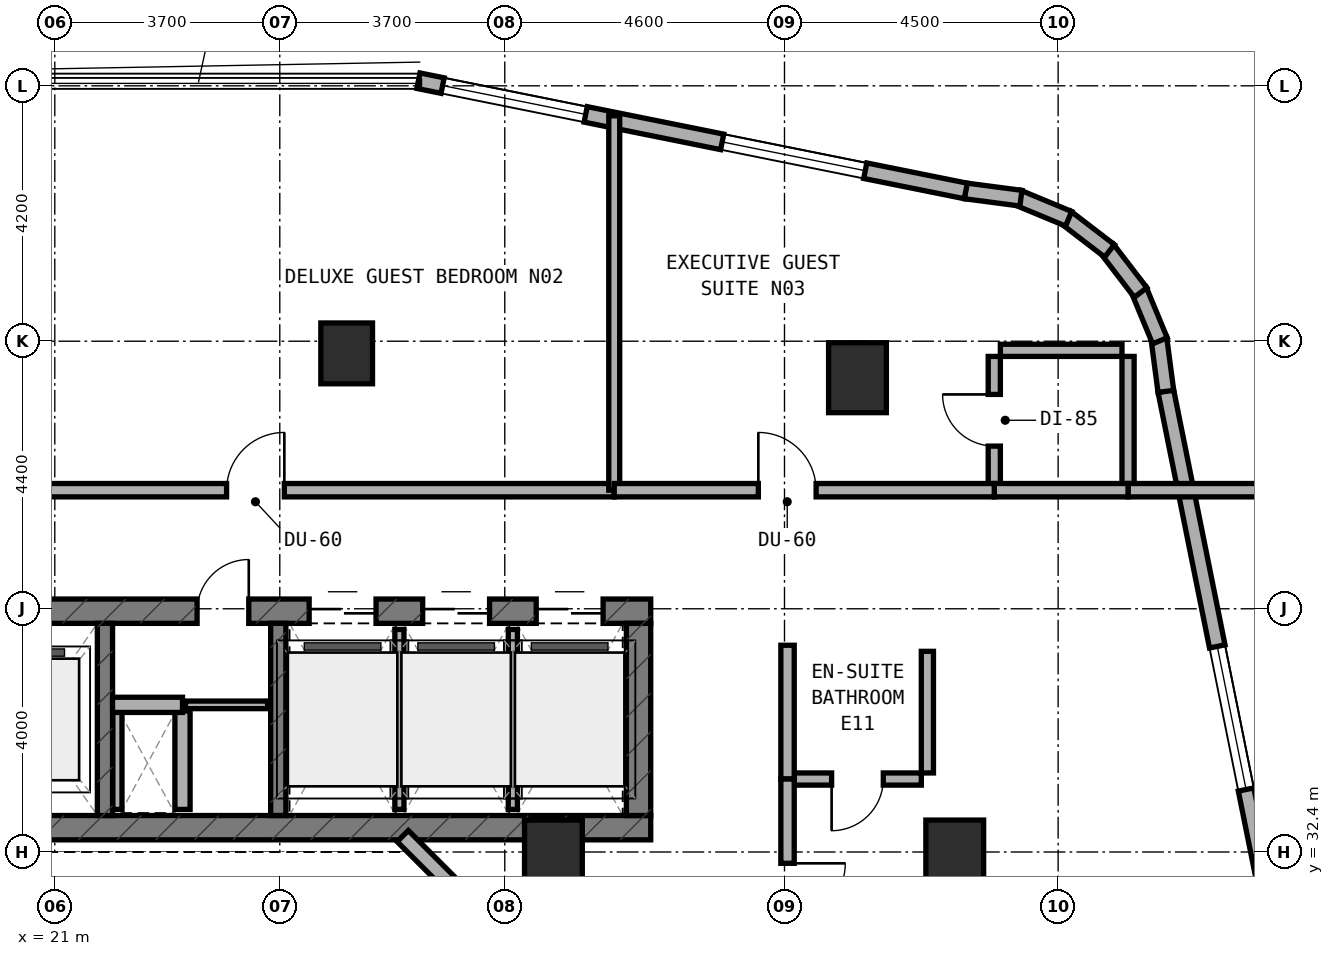
"""IFC4 building model, lengths in metres.
Left out: names, types, materials, properties, quantities, classifications, styles, units other than length and angle.
Written with IfcOpenShell. Run it as: python <this file> out.ifc"""

import sys

from ifc_helpers import new_model, si_unit, direction, frame, frame_2d, origin, origin_2d, place, context, subcontext, project, spatial, rectangle, extrude, element, fill, save


model = new_model("IFC4")
c1 = context("Model", 3, precision=1e-05, world=origin(), true_north=direction((0.0, 1.0)))
c2 = subcontext(c1, "Body", "Model", "MODEL_VIEW")
j1 = project(units=[si_unit("LENGTHUNIT", "METRE"), si_unit("PLANEANGLEUNIT", "RADIAN")], contexts=[c1])
p1 = place(None, origin())
s1 = spatial("IfcSite", under=j1, at=p1, CompositionType="ELEMENT")
p2 = place(p1, origin())
s2 = spatial("IfcBuilding", under=s1, at=p2, CompositionType="ELEMENT")
p3 = place(p2, frame((0.0, 0.0, 116.0)))
s3 = spatial("IfcBuildingStorey", under=s2, at=p3, CompositionType="ELEMENT", Elevation=116.0)
p4 = place(p3, frame((6.4, 32.8, 0.0), z_axis=(0.0, 0.0, 1.0), x_axis=(1.0, 0.0, 0.0)))
e1 = element("IfcWall", 1, at=p4, inside=s3, PredefinedType="SHEAR", context=c2, shape_type="SweptSolid", body=[
    extrude(rectangle(XDim=24.4, YDim=0.4, at=frame_2d((12.2, 0.0))), origin(), (0.0, 0.0, 1.0), 3.5),
])
p5 = place(p4, frame((6.05, 0.0, 0.0)))
e2 = element("IfcOpeningElement", 2, at=p5, cuts=e1, PredefinedType="OPENING", context=c2, shape_type="SweptSolid", body=[
    extrude(rectangle(XDim=1.1, YDim=2.15, at=frame_2d((0.55, 1.075))), frame((0.0, 0.21, 0.0), z_axis=(0.0, -1.0, 0.0), x_axis=(1.0, 0.0, 0.0)), (0.0, 0.0, 1.0), 0.42),
])
p6 = place(p3, frame((6.4, 36.36, 0.0), z_axis=(0.0, 0.0, 1.0), x_axis=(1.0, 0.0, 0.0)))
e3 = element("IfcWall", 3, at=p6, inside=s3, PredefinedType="SHEAR", context=c2, shape_type="SweptSolid", body=[
    extrude(rectangle(XDim=24.4, YDim=0.4, at=frame_2d((12.2, 0.0))), origin(), (0.0, 0.0, 1.0), 3.5),
])
p7 = place(p6, frame((9.15, 0.0, 0.0)))
e4 = element("IfcOpeningElement", 4, at=p7, cuts=e3, PredefinedType="OPENING", context=c2, shape_type="SweptSolid", body=[
    extrude(rectangle(XDim=1.2, YDim=2.15, at=frame_2d((0.6, 1.075))), frame((0.0, 0.21, 0.0), z_axis=(0.0, -1.0, 0.0), x_axis=(1.0, 0.0, 0.0)), (0.0, 0.0, 1.0), 0.42),
])
p8 = place(p6, frame((16.94, 0.0, 0.0)))
e5 = element("IfcOpeningElement", 5, at=p8, cuts=e3, PredefinedType="OPENING", context=c2, shape_type="SweptSolid", body=[
    extrude(rectangle(XDim=0.85, YDim=2.1, at=frame_2d((0.425, 1.05))), frame((0.0, 0.21, 0.0), z_axis=(0.0, -1.0, 0.0), x_axis=(1.0, 0.0, 0.0)), (0.0, 0.0, 1.0), 0.42),
])
p9 = place(p6, frame((18.783, 0.0, 0.0)))
e6 = element("IfcOpeningElement", 6, at=p9, cuts=e3, PredefinedType="OPENING", context=c2, shape_type="SweptSolid", body=[
    extrude(rectangle(XDim=1.1, YDim=2.15, at=frame_2d((0.55, 1.075))), frame((0.0, 0.21, 0.0), z_axis=(0.0, -1.0, 0.0), x_axis=(1.0, 0.0, 0.0)), (0.0, 0.0, 1.0), 0.42),
])
p10 = place(p6, frame((20.65, 0.0, 0.0)))
e7 = element("IfcOpeningElement", 7, at=p10, cuts=e3, PredefinedType="OPENING", context=c2, shape_type="SweptSolid", body=[
    extrude(rectangle(XDim=1.1, YDim=2.15, at=frame_2d((0.55, 1.075))), frame((0.0, 0.21, 0.0), z_axis=(0.0, -1.0, 0.0), x_axis=(1.0, 0.0, 0.0)), (0.0, 0.0, 1.0), 0.42),
])
p11 = place(p6, frame((22.517, 0.0, 0.0)))
e8 = element("IfcOpeningElement", 8, at=p11, cuts=e3, PredefinedType="OPENING", context=c2, shape_type="SweptSolid", body=[
    extrude(rectangle(XDim=1.1, YDim=2.15, at=frame_2d((0.55, 1.075))), frame((0.0, 0.21, 0.0), z_axis=(0.0, -1.0, 0.0), x_axis=(1.0, 0.0, 0.0)), (0.0, 0.0, 1.0), 0.42),
])
p12 = place(p3, frame((30.6, 33.0, 0.0), z_axis=(0.0, 0.0, 1.0), x_axis=(0.0, 1.0, 0.0)))
e9 = element("IfcWall", 9, at=p12, inside=s3, PredefinedType="SHEAR", context=c2, shape_type="SweptSolid", body=[
    extrude(rectangle(XDim=3.16, YDim=0.4, at=frame_2d((1.58, 0.0))), origin(), (0.0, 0.0, 1.0), 3.5),
])
for number, where, z_axis, x_axis in (
    (10, (21.825, 33.0, 0.0), (0.0, 0.0, 1.0), (0.0, 1.0, 0.0)),
    (11, (24.675, 33.0, 0.0), (0.0, 0.0, 1.0), (0.0, 1.0, 0.0)),
):
    element("IfcWall", number, at=place(p3, frame(where, z_axis=z_axis, x_axis=x_axis)), inside=s3, PredefinedType="STANDARD", context=c2, shape_type="SweptSolid", body=[
        extrude(rectangle(XDim=3.16, YDim=0.25, at=frame_2d((1.58, 0.0))), origin(), (0.0, 0.0, 1.0), 3.18),
    ])
p13 = place(p3, frame((25.8, 40.6, 0.0), z_axis=(0.0, 0.0, 1.0), x_axis=(1.0, 0.0, 0.0)))
e12 = element("IfcColumn", 12, at=p13, inside=s3, PredefinedType="COLUMN", context=c2, shape_type="SweptSolid", body=[
    extrude(rectangle(XDim=0.85, YDim=1.0, at=origin_2d()), origin(), (0.0, 0.0, 1.0), 3.5),
])
for number, where, z_axis, x_axis in (
    (13, (34.2, 40.2, 0.0), (0.0, 0.0, 1.0), (1.0, 0.0, 0.0)),
    (14, (35.8, 32.35, 0.0), (0.0, 0.0, 1.0), (1.0, 0.0, 0.0)),
    (15, (29.2, 32.35, 0.0), (0.0, 0.0, 1.0), (1.0, 0.0, 0.0)),
):
    element("IfcColumn", number, at=place(p3, frame(where, z_axis=z_axis, x_axis=x_axis)), inside=s3, PredefinedType="COLUMN", context=c2, shape_type="SweptSolid", body=[
        extrude(rectangle(XDim=0.95, YDim=1.15, at=origin_2d()), origin(), (0.0, 0.0, 1.0), 3.5),
    ])
p14 = place(p3, frame((41.084, 30.98, 0.0), z_axis=(0.0, 0.0, 1.0), x_axis=(-0.197435082048, 0.980315963543, 0.0)))
e16 = element("IfcWall", 16, at=p14, inside=s3, PredefinedType="STANDARD", context=c2, shape_type="SweptSolid", body=[
    extrude(rectangle(XDim=9.183, YDim=0.26, at=frame_2d((4.591, 0.0))), origin(), (0.0, 0.0, 1.0), 3.18),
])
p15 = place(p14, frame((2.497, 0.0, 0.8)))
e17 = element("IfcOpeningElement", 17, at=p15, cuts=e16, PredefinedType="OPENING", context=c2, shape_type="SweptSolid", body=[
    extrude(rectangle(XDim=2.4, YDim=1.6, at=frame_2d((1.2, 0.8))), frame((0.0, 0.14, 0.0), z_axis=(0.0, -1.0, 0.0), x_axis=(1.0, 0.0, 0.0)), (0.0, 0.0, 1.0), 0.28),
])
p16 = place(p3, frame((39.272, 39.975, 0.0), z_axis=(0.0, 0.0, 1.0), x_axis=(-0.130953706898, 0.991388484223, 0.0)))
e18 = element("IfcWall", 18, at=p16, inside=s3, PredefinedType="STANDARD", context=c2, shape_type="SweptSolid", body=[
    extrude(rectangle(XDim=0.885, YDim=0.26, at=frame_2d((0.443, 0.0))), origin(), (0.0, 0.0, 1.0), 3.18),
])
p17 = place(p3, frame((39.174, 40.807, 0.0), z_axis=(0.0, 0.0, 1.0), x_axis=(-0.383290660547, 0.923627776508, 0.0)))
e19 = element("IfcWall", 19, at=p17, inside=s3, PredefinedType="STANDARD", context=c2, shape_type="SweptSolid", body=[
    extrude(rectangle(XDim=0.903, YDim=0.26, at=frame_2d((0.452, 0.0))), origin(), (0.0, 0.0, 1.0), 3.18),
])
p18 = place(p3, frame((38.856, 41.601, 0.0), z_axis=(0.0, 0.0, 1.0), x_axis=(-0.608624690463, 0.793458244748, 0.0)))
e20 = element("IfcWall", 20, at=p18, inside=s3, PredefinedType="STANDARD", context=c2, shape_type="SweptSolid", body=[
    extrude(rectangle(XDim=0.902, YDim=0.26, at=frame_2d((0.451, 0.0))), origin(), (0.0, 0.0, 1.0), 3.18),
])
p19 = place(p3, frame((38.345, 42.286, 0.0), z_axis=(0.0, 0.0, 1.0), x_axis=(-0.793558456666, 0.608494022858, 0.0)))
e21 = element("IfcWall", 21, at=p19, inside=s3, PredefinedType="STANDARD", context=c2, shape_type="SweptSolid", body=[
    extrude(rectangle(XDim=0.902, YDim=0.26, at=frame_2d((0.451, 0.0))), origin(), (0.0, 0.0, 1.0), 3.18),
])
p20 = place(p3, frame((37.673, 42.814, 0.0), z_axis=(0.0, 0.0, 1.0), x_axis=(-0.923683767999, 0.383155708213, 0.0)))
e22 = element("IfcWall", 22, at=p20, inside=s3, PredefinedType="STANDARD", context=c2, shape_type="SweptSolid", body=[
    extrude(rectangle(XDim=0.903, YDim=0.26, at=frame_2d((0.451, 0.0))), origin(), (0.0, 0.0, 1.0), 3.18),
])
p21 = place(p3, frame((36.888, 43.152, 0.0), z_axis=(0.0, 0.0, 1.0), x_axis=(-0.991487658083, 0.130200706103, 0.0)))
e23 = element("IfcWall", 23, at=p21, inside=s3, PredefinedType="STANDARD", context=c2, shape_type="SweptSolid", body=[
    extrude(rectangle(XDim=0.921, YDim=0.26, at=frame_2d((0.46, 0.0))), origin(), (0.0, 0.0, 1.0), 3.18),
])
p22 = place(p3, frame((35.982, 43.271, 0.0), z_axis=(0.0, 0.0, 1.0), x_axis=(-0.980315963543, 0.197435082048, 0.0)))
e24 = element("IfcWall", 24, at=p22, inside=s3, PredefinedType="STANDARD", context=c2, shape_type="SweptSolid", body=[
    extrude(rectangle(XDim=9.183, YDim=0.26, at=frame_2d((4.591, 0.0))), origin(), (0.0, 0.0, 1.0), 3.18),
])
p23 = place(p22, frame((1.687, 0.0, 0.8)))
e25 = element("IfcOpeningElement", 25, at=p23, cuts=e24, PredefinedType="OPENING", context=c2, shape_type="SweptSolid", body=[
    extrude(rectangle(XDim=2.4, YDim=1.6, at=frame_2d((1.2, 0.8))), frame((0.0, 0.14, 0.0), z_axis=(0.0, -1.0, 0.0), x_axis=(1.0, 0.0, 0.0)), (0.0, 0.0, 1.0), 0.28),
])
p24 = place(p22, frame((6.377, 0.0, 0.8)))
e26 = element("IfcOpeningElement", 26, at=p24, cuts=e24, PredefinedType="OPENING", context=c2, shape_type="SweptSolid", body=[
    extrude(rectangle(XDim=2.4, YDim=1.6, at=frame_2d((1.2, 0.8))), frame((0.0, 0.14, 0.0), z_axis=(0.0, -1.0, 0.0), x_axis=(1.0, 0.0, 0.0)), (0.0, 0.0, 1.0), 0.28),
])
p25 = place(p3, frame((28.556, 30.828, 0.0), z_axis=(0.0, 0.0, 1.0), x_axis=(-0.707059717605, 0.707153841636, 0.0)))
e27 = element("IfcWall", 27, at=p25, inside=s3, PredefinedType="STANDARD", context=c2, shape_type="SweptSolid", body=[
    extrude(rectangle(XDim=2.594, YDim=0.26, at=frame_2d((1.297, 0.0))), origin(), (0.0, 0.0, 1.0), 3.18),
])
p26 = place(p3, frame((22.03, 33.1, 0.0), z_axis=(0.0, 0.0, 1.0), x_axis=(0.0, 1.0, 0.0)))
e28 = element("IfcWall", 28, at=p26, inside=s3, PredefinedType="PARTITIONING", context=c2, shape_type="SweptSolid", body=[
    extrude(rectangle(XDim=1.62, YDim=0.15, at=frame_2d((0.81, 0.0))), origin(), (0.0, 0.0, 1.0), 3.18),
])
p27 = place(p3, frame((23.1, 33.1, 0.0), z_axis=(0.0, 0.0, 1.0), x_axis=(0.0, 1.0, 0.0)))
e29 = element("IfcWall", 29, at=p27, inside=s3, PredefinedType="SOLIDWALL", context=c2, shape_type="SweptSolid", body=[
    extrude(rectangle(XDim=1.62, YDim=0.25, at=frame_2d((0.81, 0.0))), origin(), (0.0, 0.0, 1.0), 3.18),
])
p28 = place(p3, frame((21.95, 34.82, 0.0), z_axis=(0.0, 0.0, 1.0), x_axis=(1.0, 0.0, 0.0)))
e30 = element("IfcWall", 30, at=p28, inside=s3, PredefinedType="SOLIDWALL", context=c2, shape_type="SweptSolid", body=[
    extrude(rectangle(XDim=1.15, YDim=0.25, at=frame_2d((0.575, 0.0))), origin(), (0.0, 0.0, 1.0), 3.18),
])
p29 = place(p3, frame((23.15, 34.82, 0.0), z_axis=(0.0, 0.0, 1.0), x_axis=(1.0, 0.0, 0.0)))
e31 = element("IfcWall", 31, at=p29, inside=s3, PredefinedType="PARTITIONING", context=c2, shape_type="SweptSolid", body=[
    extrude(rectangle(XDim=1.35, YDim=0.125, at=frame_2d((0.675, 0.0))), origin(), (0.0, 0.0, 1.0), 3.18),
])
p30 = place(p3, frame((26.667, 33.1, 0.0), z_axis=(0.0, 0.0, 1.0), x_axis=(0.0, 1.0, 0.0)))
e32 = element("IfcWall", 32, at=p30, inside=s3, PredefinedType="PARTITIONING", context=c2, shape_type="SweptSolid", body=[
    extrude(rectangle(XDim=2.96, YDim=0.15, at=frame_2d((1.48, 0.0))), origin(), (0.0, 0.0, 1.0), 3.18),
])
p31 = place(p3, frame((28.533, 33.1, 0.0), z_axis=(0.0, 0.0, 1.0), x_axis=(0.0, 1.0, 0.0)))
e33 = element("IfcWall", 33, at=p31, inside=s3, PredefinedType="PARTITIONING", context=c2, shape_type="SweptSolid", body=[
    extrude(rectangle(XDim=2.96, YDim=0.15, at=frame_2d((1.48, 0.0))), origin(), (0.0, 0.0, 1.0), 2.655),
])
p32 = place(p3, frame((18.4, 38.35, 0.0), z_axis=(0.0, 0.0, 1.0), x_axis=(1.0, 0.0, 0.0)))
e34 = element("IfcWall", 34, at=p32, inside=s3, PredefinedType="SOLIDWALL", context=c2, shape_type="SweptSolid", body=[
    extrude(rectangle(XDim=11.8, YDim=0.22, at=frame_2d((5.9, 0.0))), origin(), (0.0, 0.0, 1.0), 2.655),
])
p33 = place(p32, frame((5.425, 0.0, 0.0)))
e35 = element("IfcOpeningElement", 35, at=p33, cuts=e34, PredefinedType="OPENING", context=c2, shape_type="SweptSolid", body=[
    extrude(rectangle(XDim=0.95, YDim=2.1, at=frame_2d((0.475, 1.05))), frame((0.0, 0.12, 0.0), z_axis=(0.0, -1.0, 0.0), x_axis=(1.0, 0.0, 0.0)), (0.0, 0.0, 1.0), 0.24),
])
p34 = place(p3, frame((30.2, 38.35, 0.0), z_axis=(0.0, 0.0, 1.0), x_axis=(0.0, 1.0, 0.0)))
e36 = element("IfcWall", 36, at=p34, inside=s3, PredefinedType="SOLIDWALL", context=c2, shape_type="SweptSolid", body=[
    extrude(rectangle(XDim=6.157, YDim=0.18, at=frame_2d((3.079, 0.0))), origin(), (0.0, 0.0, 1.0), 2.795),
])
p35 = place(p3, frame((36.45, 38.45, 0.0), z_axis=(0.0, 0.0, 1.0), x_axis=(0.0, 1.0, 0.0)))
e37 = element("IfcWall", 37, at=p35, inside=s3, PredefinedType="PLUMBINGWALL", context=c2, shape_type="SweptSolid", body=[
    extrude(rectangle(XDim=2.1, YDim=0.2, at=frame_2d((1.05, 0.0))), origin(), (0.0, 0.0, 1.0), 3.18),
])
p36 = place(p35, frame((0.625, 0.0, 0.0)))
e38 = element("IfcOpeningElement", 38, at=p36, cuts=e37, PredefinedType="OPENING", context=c2, shape_type="SweptSolid", body=[
    extrude(rectangle(XDim=0.85, YDim=2.1, at=frame_2d((0.425, 1.05))), frame((0.0, 0.11, 0.0), z_axis=(0.0, -1.0, 0.0), x_axis=(1.0, 0.0, 0.0)), (0.0, 0.0, 1.0), 0.22),
])
p37 = place(p3, frame((36.55, 40.65, 0.0), z_axis=(0.0, 0.0, 1.0), x_axis=(1.0, 0.0, 0.0)))
e39 = element("IfcWall", 39, at=p37, inside=s3, PredefinedType="PLUMBINGWALL", context=c2, shape_type="SweptSolid", body=[
    extrude(rectangle(XDim=2.0, YDim=0.2, at=frame_2d((1.0, 0.0))), origin(), (0.0, 0.0, 1.0), 3.18),
])
p38 = place(p3, frame((38.65, 38.45, 0.0), z_axis=(0.0, 0.0, 1.0), x_axis=(0.0, 1.0, 0.0)))
e40 = element("IfcWall", 40, at=p38, inside=s3, PredefinedType="PLUMBINGWALL", context=c2, shape_type="SweptSolid", body=[
    extrude(rectangle(XDim=2.1, YDim=0.2, at=frame_2d((1.05, 0.0))), origin(), (0.0, 0.0, 1.0), 3.18),
])
p39 = place(p3, frame((38.65, 38.35, 0.0), z_axis=(0.0, 0.0, 1.0), x_axis=(1.0, 0.0, 0.0)))
e41 = element("IfcWall", 41, at=p39, inside=s3, PredefinedType="SOLIDWALL", context=c2, shape_type="SweptSolid", body=[
    extrude(rectangle(XDim=2.39, YDim=0.22, at=frame_2d((1.195, 0.0))), origin(), (0.0, 0.0, 1.0), 3.18),
])
p40 = place(p3, frame((36.45, 38.35, 0.0), z_axis=(0.0, 0.0, 1.0), x_axis=(1.0, 0.0, 0.0)))
e42 = element("IfcWall", 42, at=p40, inside=s3, PredefinedType="SOLIDWALL", context=c2, shape_type="SweptSolid", body=[
    extrude(rectangle(XDim=2.2, YDim=0.22, at=frame_2d((1.1, 0.0))), origin(), (0.0, 0.0, 1.0), 3.18),
])
p41 = place(p3, frame((30.2, 38.35, 0.0), z_axis=(0.0, 0.0, 1.0), x_axis=(1.0, 0.0, 0.0)))
e43 = element("IfcWall", 43, at=p41, inside=s3, PredefinedType="SOLIDWALL", context=c2, shape_type="SweptSolid", body=[
    extrude(rectangle(XDim=6.25, YDim=0.22, at=frame_2d((3.125, 0.0))), origin(), (0.0, 0.0, 1.0), 2.655),
])
p42 = place(p41, frame((2.37, 0.0, 0.0)))
e44 = element("IfcOpeningElement", 44, at=p42, cuts=e43, PredefinedType="OPENING", context=c2, shape_type="SweptSolid", body=[
    extrude(rectangle(XDim=0.95, YDim=2.1, at=frame_2d((0.475, 1.05))), frame((0.0, 0.12, 0.0), z_axis=(0.0, -1.0, 0.0), x_axis=(1.0, 0.0, 0.0)), (0.0, 0.0, 1.0), 0.24),
])
p43 = place(p3, frame((33.15, 33.6, 0.0), z_axis=(0.0, 0.0, 1.0), x_axis=(1.0, 0.0, 0.0)))
e45 = element("IfcWall", 45, at=p43, inside=s3, PredefinedType="PLUMBINGWALL", context=c2, shape_type="SweptSolid", body=[
    extrude(rectangle(XDim=2.1, YDim=0.2, at=frame_2d((1.05, 0.0))), origin(), (0.0, 0.0, 1.0), 3.18),
])
p44 = place(p43, frame((0.625, 0.0, 0.0)))
e46 = element("IfcOpeningElement", 46, at=p44, cuts=e45, PredefinedType="OPENING", context=c2, shape_type="SweptSolid", body=[
    extrude(rectangle(XDim=0.85, YDim=2.1, at=frame_2d((0.425, 1.05))), frame((0.0, 0.11, 0.0), z_axis=(0.0, -1.0, 0.0), x_axis=(1.0, 0.0, 0.0)), (0.0, 0.0, 1.0), 0.22),
])
p45 = place(p3, frame((35.35, 33.7, 0.0), z_axis=(0.0, 0.0, 1.0), x_axis=(0.0, 1.0, 0.0)))
e47 = element("IfcWall", 47, at=p45, inside=s3, PredefinedType="PLUMBINGWALL", context=c2, shape_type="SweptSolid", body=[
    extrude(rectangle(XDim=2.0, YDim=0.2, at=frame_2d((1.0, 0.0))), origin(), (0.0, 0.0, 1.0), 2.795),
])
p46 = place(p3, frame((33.05, 33.6, 0.0), z_axis=(0.0, 0.0, 1.0), x_axis=(0.0, 1.0, 0.0)))
e48 = element("IfcWall", 48, at=p46, inside=s3, PredefinedType="SOLIDWALL", context=c2, shape_type="SweptSolid", body=[
    extrude(rectangle(XDim=2.2, YDim=0.22, at=frame_2d((1.1, 0.0))), origin(), (0.0, 0.0, 1.0), 3.18),
])
p47 = place(p3, frame((33.05, 29.878, 0.0), z_axis=(0.0, 0.0, 1.0), x_axis=(0.0, 1.0, 0.0)))
e49 = element("IfcWall", 49, at=p47, inside=s3, PredefinedType="SOLIDWALL", context=c2, shape_type="SweptSolid", body=[
    extrude(rectangle(XDim=3.722, YDim=0.22, at=frame_2d((1.861, 0.0))), origin(), (0.0, 0.0, 1.0), 2.655),
])
p48 = place(p47, frame((1.386, 0.0, 0.0)))
e50 = element("IfcOpeningElement", 50, at=p48, cuts=e49, PredefinedType="OPENING", context=c2, shape_type="SweptSolid", body=[
    extrude(rectangle(XDim=0.95, YDim=2.1, at=frame_2d((0.475, 1.05))), frame((0.0, 0.12, 0.0), z_axis=(0.0, -1.0, 0.0), x_axis=(1.0, 0.0, 0.0)), (0.0, 0.0, 1.0), 0.24),
])
p49 = place(p15, origin())
e51 = element("IfcWindow", 51, at=p49, inside=s3, PartitioningType="SINGLE_PANEL", PredefinedType="WINDOW", context=c2, shape_type="SweptSolid", body=[
    extrude(rectangle(XDim=2.4, YDim=1.6, at=frame_2d((1.2, 0.8))), frame((0.0, 0.03, 0.0), z_axis=(0.0, -1.0, 0.0), x_axis=(1.0, 0.0, 0.0)), (0.0, 0.0, 1.0), 0.06),
])
fill(e17, e51)
p50 = place(p23, origin())
e52 = element("IfcWindow", 52, at=p50, inside=s3, PartitioningType="SINGLE_PANEL", PredefinedType="WINDOW", context=c2, shape_type="SweptSolid", body=[
    extrude(rectangle(XDim=2.4, YDim=1.6, at=frame_2d((1.2, 0.8))), frame((0.0, 0.03, 0.0), z_axis=(0.0, -1.0, 0.0), x_axis=(1.0, 0.0, 0.0)), (0.0, 0.0, 1.0), 0.06),
])
fill(e25, e52)
p51 = place(p24, origin())
e53 = element("IfcWindow", 53, at=p51, inside=s3, PartitioningType="SINGLE_PANEL", PredefinedType="WINDOW", context=c2, shape_type="SweptSolid", body=[
    extrude(rectangle(XDim=2.4, YDim=1.6, at=frame_2d((1.2, 0.8))), frame((0.0, 0.03, 0.0), z_axis=(0.0, -1.0, 0.0), x_axis=(1.0, 0.0, 0.0)), (0.0, 0.0, 1.0), 0.06),
])
fill(e26, e53)
p52 = place(p8, origin())
e54 = element("IfcDoor", 54, at=p52, inside=s3, OperationType="SINGLE_SWING_RIGHT", PredefinedType="DOOR", context=c2, shape_type="SweptSolid", body=[
    extrude(rectangle(XDim=0.85, YDim=2.1, at=frame_2d((0.425, 1.05))), frame((0.0, 0.025, 0.0), z_axis=(0.0, -1.0, 0.0), x_axis=(1.0, 0.0, 0.0)), (0.0, 0.0, 1.0), 0.05),
])
fill(e5, e54)
p53 = place(p9, origin())
e55 = element("IfcDoor", 55, at=p53, inside=s3, OperationType="DOUBLE_DOOR_SLIDING", PredefinedType="DOOR", context=c2, shape_type="SweptSolid", body=[
    extrude(rectangle(XDim=1.1, YDim=2.15, at=frame_2d((0.55, 1.075))), frame((0.0, 0.025, 0.0), z_axis=(0.0, -1.0, 0.0), x_axis=(1.0, 0.0, 0.0)), (0.0, 0.0, 1.0), 0.05),
])
fill(e6, e55)
p54 = place(p10, origin())
e56 = element("IfcDoor", 56, at=p54, inside=s3, OperationType="DOUBLE_DOOR_SLIDING", PredefinedType="DOOR", context=c2, shape_type="SweptSolid", body=[
    extrude(rectangle(XDim=1.1, YDim=2.15, at=frame_2d((0.55, 1.075))), frame((0.0, 0.025, 0.0), z_axis=(0.0, -1.0, 0.0), x_axis=(1.0, 0.0, 0.0)), (0.0, 0.0, 1.0), 0.05),
])
fill(e7, e56)
p55 = place(p11, origin())
e57 = element("IfcDoor", 57, at=p55, inside=s3, OperationType="DOUBLE_DOOR_SLIDING", PredefinedType="DOOR", context=c2, shape_type="SweptSolid", body=[
    extrude(rectangle(XDim=1.1, YDim=2.15, at=frame_2d((0.55, 1.075))), frame((0.0, 0.025, 0.0), z_axis=(0.0, -1.0, 0.0), x_axis=(1.0, 0.0, 0.0)), (0.0, 0.0, 1.0), 0.05),
])
fill(e8, e57)
p56 = place(p33, origin())
e58 = element("IfcDoor", 58, at=p56, inside=s3, OperationType="SINGLE_SWING_RIGHT", PredefinedType="DOOR", context=c2, shape_type="SweptSolid", body=[
    extrude(rectangle(XDim=0.95, YDim=2.1, at=frame_2d((0.475, 1.05))), frame((0.0, 0.025, 0.0), z_axis=(0.0, -1.0, 0.0), x_axis=(1.0, 0.0, 0.0)), (0.0, 0.0, 1.0), 0.05),
])
fill(e35, e58)
p57 = place(p36, origin())
e59 = element("IfcDoor", 59, at=p57, inside=s3, OperationType="SINGLE_SWING_RIGHT", PredefinedType="DOOR", context=c2, shape_type="SweptSolid", body=[
    extrude(rectangle(XDim=0.85, YDim=2.1, at=frame_2d((0.425, 1.05))), frame((0.0, 0.025, 0.0), z_axis=(0.0, -1.0, 0.0), x_axis=(1.0, 0.0, 0.0)), (0.0, 0.0, 1.0), 0.05),
])
fill(e38, e59)
p58 = place(p42, origin())
e60 = element("IfcDoor", 60, at=p58, inside=s3, OperationType="SINGLE_SWING_LEFT", PredefinedType="DOOR", context=c2, shape_type="SweptSolid", body=[
    extrude(rectangle(XDim=0.95, YDim=2.1, at=frame_2d((0.475, 1.05))), frame((0.0, 0.025, 0.0), z_axis=(0.0, -1.0, 0.0), x_axis=(1.0, 0.0, 0.0)), (0.0, 0.0, 1.0), 0.05),
])
fill(e44, e60)
p59 = place(p44, frame((0.85, 0.0, 0.0), z_axis=(0.0, 0.0, 1.0), x_axis=(-1.0, 0.0, 0.0)))
e61 = element("IfcDoor", 61, at=p59, inside=s3, OperationType="SINGLE_SWING_RIGHT", PredefinedType="DOOR", context=c2, shape_type="SweptSolid", body=[
    extrude(rectangle(XDim=0.85, YDim=2.1, at=frame_2d((0.425, 1.05))), frame((0.0, 0.025, 0.0), z_axis=(0.0, -1.0, 0.0), x_axis=(1.0, 0.0, 0.0)), (0.0, 0.0, 1.0), 0.05),
])
fill(e46, e61)
p60 = place(p48, frame((0.95, 0.0, 0.0), z_axis=(0.0, 0.0, 1.0), x_axis=(-1.0, 0.0, 0.0)))
e62 = element("IfcDoor", 62, at=p60, inside=s3, OperationType="SINGLE_SWING_LEFT", PredefinedType="DOOR", context=c2, shape_type="SweptSolid", body=[
    extrude(rectangle(XDim=0.95, YDim=2.1, at=frame_2d((0.475, 1.05))), frame((0.0, 0.025, 0.0), z_axis=(0.0, -1.0, 0.0), x_axis=(1.0, 0.0, 0.0)), (0.0, 0.0, 1.0), 0.05),
])
fill(e50, e62)
save(model, sys.argv[1])
